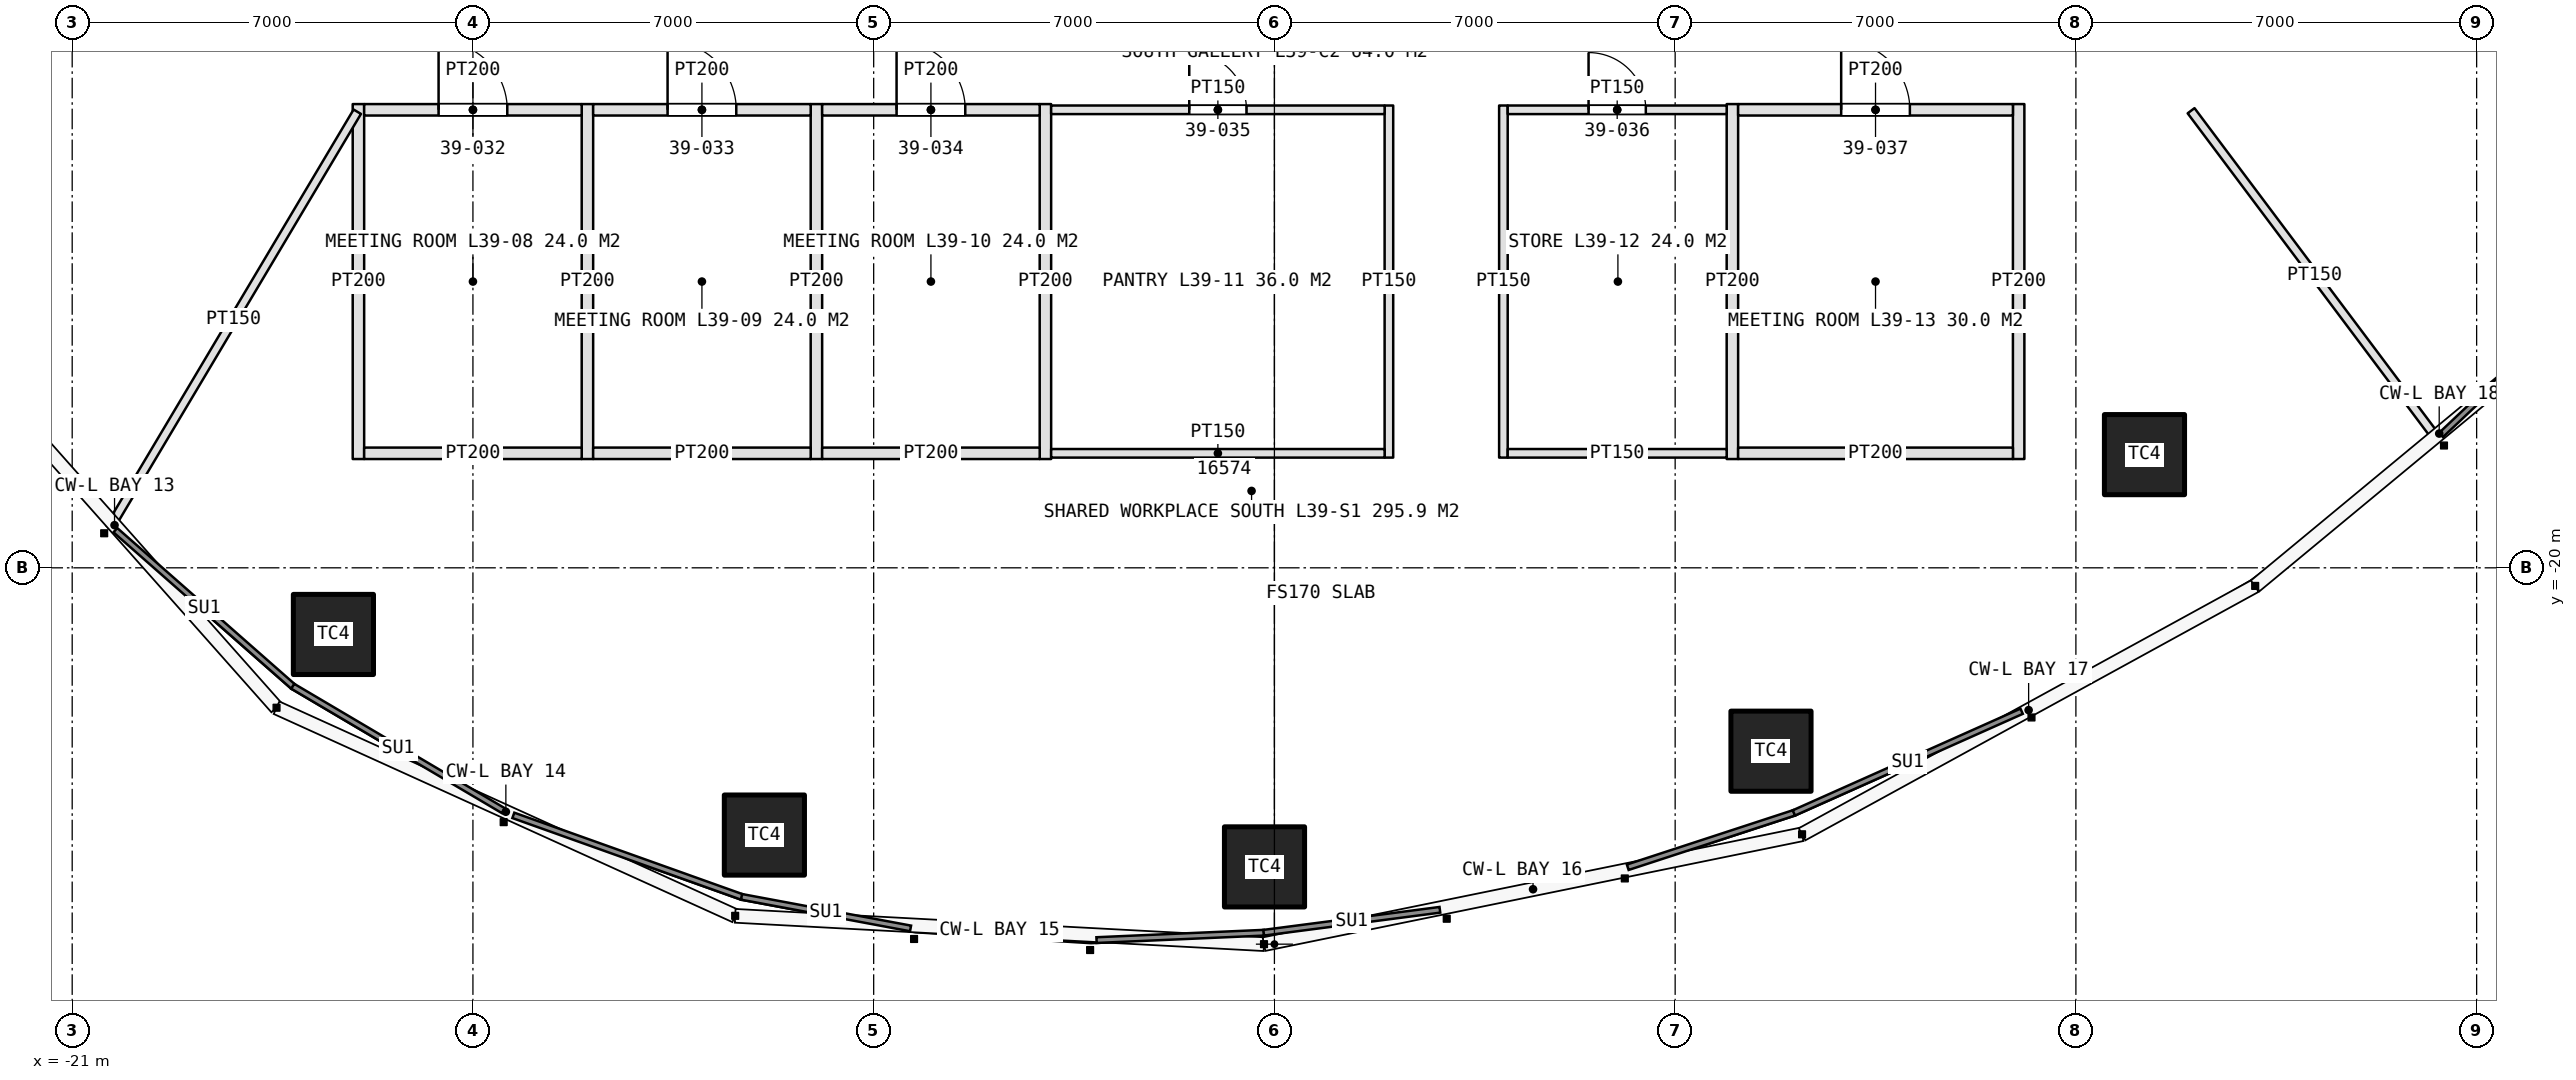
"""IFC4 building model, lengths in metres.
Left out: names, types, materials, properties, quantities, classifications, styles, units other than length and angle.
Written with IfcOpenShell. Run it as: python <this file> out.ifc"""

import sys

from ifc_helpers import new_model, si_unit, direction, frame, frame_2d, origin, origin_2d, place, context, subcontext, project, spatial, rectangle, extrude, element, fill, save


model = new_model("IFC4")
c1 = context("Model", 3, precision=1e-05, world=origin(), true_north=direction((0.0, 1.0)))
c2 = subcontext(c1, "Body", "Model", "MODEL_VIEW")
j1 = project(units=[si_unit("LENGTHUNIT", "METRE"), si_unit("PLANEANGLEUNIT", "RADIAN")], contexts=[c1])
p1 = place(None, origin())
s1 = spatial("IfcSite", under=j1, at=p1, CompositionType="ELEMENT")
p2 = place(p1, origin())
s2 = spatial("IfcBuilding", under=s1, at=p2, CompositionType="ELEMENT")
p3 = place(p2, frame((0.0, 0.0, 180.6)))
s3 = spatial("IfcBuildingStorey", under=s2, at=p3, CompositionType="ELEMENT", Elevation=180.6)
for number, where, z_axis, x_axis in (
    (1, (-16.437, -21.164, 0.0), (0.0, 0.0, 1.0), (1.0, 0.0, 0.0)),
    (2, (-8.909, -24.668, 0.0), (0.0, 0.0, 1.0), (1.0, 0.0, 0.0)),
    (3, (-0.173, -25.224, 0.0), (0.0, 0.0, 1.0), (1.0, 0.0, 0.0)),
    (4, (8.674, -23.203, 0.0), (0.0, 0.0, 1.0), (1.0, 0.0, 0.0)),
    (5, (15.198, -18.023, 0.0), (0.0, 0.0, 1.0), (1.0, 0.0, 0.0)),
):
    element("IfcColumn", number, at=place(p3, frame(where, z_axis=z_axis, x_axis=x_axis)), inside=s3, PredefinedType="COLUMN", context=c2, shape_type="SweptSolid", body=[
        extrude(rectangle(XDim=1.4, YDim=1.4, at=origin_2d()), origin(), (0.0, 0.0, 1.0), 4.2),
    ])
for number, where, z_axis, x_axis in (
    (6, (-16.0, -11.9, 0.0), (0.0, 0.0, 1.0), (0.0, -1.0, 0.0)),
    (7, (-12.0, -11.9, 0.0), (0.0, 0.0, 1.0), (0.0, -1.0, 0.0)),
    (8, (-8.0, -11.9, 0.0), (0.0, 0.0, 1.0), (0.0, -1.0, 0.0)),
    (9, (-4.0, -11.9, 0.0), (0.0, 0.0, 1.0), (0.0, -1.0, 0.0)),
):
    element("IfcWall", number, at=place(p3, frame(where, z_axis=z_axis, x_axis=x_axis)), inside=s3, PredefinedType="PARTITIONING", context=c2, shape_type="SweptSolid", body=[
        extrude(rectangle(XDim=6.2, YDim=0.2, at=frame_2d((3.1, 0.0))), origin(), (0.0, 0.0, 1.0), 3.0),
    ])
p4 = place(p3, frame((2.0, -11.925, 0.0), z_axis=(0.0, 0.0, 1.0), x_axis=(0.0, -1.0, 0.0)))
e10 = element("IfcWall", 10, at=p4, inside=s3, PredefinedType="PARTITIONING", context=c2, shape_type="SweptSolid", body=[
    extrude(rectangle(XDim=6.15, YDim=0.15, at=frame_2d((3.075, 0.0))), origin(), (0.0, 0.0, 1.0), 3.0),
])
p5 = place(p3, frame((-15.9, -12.0, 0.0), z_axis=(0.0, 0.0, 1.0), x_axis=(1.0, 0.0, 0.0)))
e11 = element("IfcWall", 11, at=p5, inside=s3, PredefinedType="PARTITIONING", context=c2, shape_type="SweptSolid", body=[
    extrude(rectangle(XDim=3.8, YDim=0.2, at=frame_2d((1.9, 0.0))), origin(), (0.0, 0.0, 1.0), 3.0),
])
p6 = place(p5, frame((1.3, 0.0, 0.0)))
e12 = element("IfcOpeningElement", 12, at=p6, cuts=e11, PredefinedType="OPENING", context=c2, shape_type="SweptSolid", body=[
    extrude(rectangle(XDim=1.2, YDim=2.4, at=frame_2d((0.6, 1.2))), frame((0.0, 0.11, 0.0), z_axis=(0.0, -1.0, 0.0), x_axis=(1.0, 0.0, 0.0)), (0.0, 0.0, 1.0), 0.22),
])
p7 = place(p3, frame((-15.9, -18.0, 0.0), z_axis=(0.0, 0.0, 1.0), x_axis=(1.0, 0.0, 0.0)))
e13 = element("IfcWall", 13, at=p7, inside=s3, PredefinedType="PARTITIONING", context=c2, shape_type="SweptSolid", body=[
    extrude(rectangle(XDim=3.8, YDim=0.2, at=frame_2d((1.9, 0.0))), origin(), (0.0, 0.0, 1.0), 3.0),
])
p8 = place(p3, frame((-11.9, -12.0, 0.0), z_axis=(0.0, 0.0, 1.0), x_axis=(1.0, 0.0, 0.0)))
e14 = element("IfcWall", 14, at=p8, inside=s3, PredefinedType="PARTITIONING", context=c2, shape_type="SweptSolid", body=[
    extrude(rectangle(XDim=3.8, YDim=0.2, at=frame_2d((1.9, 0.0))), origin(), (0.0, 0.0, 1.0), 3.0),
])
p9 = place(p8, frame((1.3, 0.0, 0.0)))
e15 = element("IfcOpeningElement", 15, at=p9, cuts=e14, PredefinedType="OPENING", context=c2, shape_type="SweptSolid", body=[
    extrude(rectangle(XDim=1.2, YDim=2.4, at=frame_2d((0.6, 1.2))), frame((0.0, 0.11, 0.0), z_axis=(0.0, -1.0, 0.0), x_axis=(1.0, 0.0, 0.0)), (0.0, 0.0, 1.0), 0.22),
])
p10 = place(p3, frame((-11.9, -18.0, 0.0), z_axis=(0.0, 0.0, 1.0), x_axis=(1.0, 0.0, 0.0)))
e16 = element("IfcWall", 16, at=p10, inside=s3, PredefinedType="PARTITIONING", context=c2, shape_type="SweptSolid", body=[
    extrude(rectangle(XDim=3.8, YDim=0.2, at=frame_2d((1.9, 0.0))), origin(), (0.0, 0.0, 1.0), 3.0),
])
p11 = place(p3, frame((-7.9, -12.0, 0.0), z_axis=(0.0, 0.0, 1.0), x_axis=(1.0, 0.0, 0.0)))
e17 = element("IfcWall", 17, at=p11, inside=s3, PredefinedType="PARTITIONING", context=c2, shape_type="SweptSolid", body=[
    extrude(rectangle(XDim=3.8, YDim=0.2, at=frame_2d((1.9, 0.0))), origin(), (0.0, 0.0, 1.0), 3.0),
])
p12 = place(p11, frame((1.3, 0.0, 0.0)))
e18 = element("IfcOpeningElement", 18, at=p12, cuts=e17, PredefinedType="OPENING", context=c2, shape_type="SweptSolid", body=[
    extrude(rectangle(XDim=1.2, YDim=2.4, at=frame_2d((0.6, 1.2))), frame((0.0, 0.11, 0.0), z_axis=(0.0, -1.0, 0.0), x_axis=(1.0, 0.0, 0.0)), (0.0, 0.0, 1.0), 0.22),
])
p13 = place(p3, frame((-7.9, -18.0, 0.0), z_axis=(0.0, 0.0, 1.0), x_axis=(1.0, 0.0, 0.0)))
e19 = element("IfcWall", 19, at=p13, inside=s3, PredefinedType="PARTITIONING", context=c2, shape_type="SweptSolid", body=[
    extrude(rectangle(XDim=3.8, YDim=0.2, at=frame_2d((1.9, 0.0))), origin(), (0.0, 0.0, 1.0), 3.0),
])
p14 = place(p3, frame((-3.9, -12.0, 0.0), z_axis=(0.0, 0.0, 1.0), x_axis=(1.0, 0.0, 0.0)))
e20 = element("IfcWall", 20, at=p14, inside=s3, PredefinedType="PARTITIONING", context=c2, shape_type="SweptSolid", body=[
    extrude(rectangle(XDim=5.825, YDim=0.15, at=frame_2d((2.913, 0.0))), origin(), (0.0, 0.0, 1.0), 3.0),
])
p15 = place(p14, frame((2.413, 0.0, 0.0)))
e21 = element("IfcOpeningElement", 21, at=p15, cuts=e20, PredefinedType="OPENING", context=c2, shape_type="SweptSolid", body=[
    extrude(rectangle(XDim=1.0, YDim=2.2, at=frame_2d((0.5, 1.1))), frame((0.0, 0.085, 0.0), z_axis=(0.0, -1.0, 0.0), x_axis=(1.0, 0.0, 0.0)), (0.0, 0.0, 1.0), 0.17),
])
p16 = place(p3, frame((-3.9, -18.0, 0.0), z_axis=(0.0, 0.0, 1.0), x_axis=(1.0, 0.0, 0.0)))
e22 = element("IfcWall", 22, at=p16, inside=s3, PredefinedType="PARTITIONING", context=c2, shape_type="SweptSolid", body=[
    extrude(rectangle(XDim=5.825, YDim=0.15, at=frame_2d((2.913, 0.0))), origin(), (0.0, 0.0, 1.0), 3.0),
])
p17 = place(p3, frame((4.0, -11.925, 0.0), z_axis=(0.0, 0.0, 1.0), x_axis=(0.0, -1.0, 0.0)))
e23 = element("IfcWall", 23, at=p17, inside=s3, PredefinedType="PARTITIONING", context=c2, shape_type="SweptSolid", body=[
    extrude(rectangle(XDim=6.15, YDim=0.15, at=frame_2d((3.075, 0.0))), origin(), (0.0, 0.0, 1.0), 3.0),
])
for number, where, z_axis, x_axis in (
    (24, (8.0, -11.9, 0.0), (0.0, 0.0, 1.0), (0.0, -1.0, 0.0)),
    (25, (13.0, -11.9, 0.0), (0.0, 0.0, 1.0), (0.0, -1.0, 0.0)),
):
    element("IfcWall", number, at=place(p3, frame(where, z_axis=z_axis, x_axis=x_axis)), inside=s3, PredefinedType="PARTITIONING", context=c2, shape_type="SweptSolid", body=[
        extrude(rectangle(XDim=6.2, YDim=0.2, at=frame_2d((3.1, 0.0))), origin(), (0.0, 0.0, 1.0), 3.0),
    ])
p18 = place(p3, frame((4.075, -12.0, 0.0), z_axis=(0.0, 0.0, 1.0), x_axis=(1.0, 0.0, 0.0)))
e26 = element("IfcWall", 26, at=p18, inside=s3, PredefinedType="PARTITIONING", context=c2, shape_type="SweptSolid", body=[
    extrude(rectangle(XDim=3.825, YDim=0.15, at=frame_2d((1.913, 0.0))), origin(), (0.0, 0.0, 1.0), 3.0),
])
p19 = place(p18, frame((1.413, 0.0, 0.0)))
e27 = element("IfcOpeningElement", 27, at=p19, cuts=e26, PredefinedType="OPENING", context=c2, shape_type="SweptSolid", body=[
    extrude(rectangle(XDim=1.0, YDim=2.2, at=frame_2d((0.5, 1.1))), frame((0.0, 0.085, 0.0), z_axis=(0.0, -1.0, 0.0), x_axis=(1.0, 0.0, 0.0)), (0.0, 0.0, 1.0), 0.17),
])
p20 = place(p3, frame((4.075, -18.0, 0.0), z_axis=(0.0, 0.0, 1.0), x_axis=(1.0, 0.0, 0.0)))
e28 = element("IfcWall", 28, at=p20, inside=s3, PredefinedType="PARTITIONING", context=c2, shape_type="SweptSolid", body=[
    extrude(rectangle(XDim=3.825, YDim=0.15, at=frame_2d((1.913, 0.0))), origin(), (0.0, 0.0, 1.0), 3.0),
])
p21 = place(p3, frame((8.1, -12.0, 0.0), z_axis=(0.0, 0.0, 1.0), x_axis=(1.0, 0.0, 0.0)))
e29 = element("IfcWall", 29, at=p21, inside=s3, PredefinedType="PARTITIONING", context=c2, shape_type="SweptSolid", body=[
    extrude(rectangle(XDim=4.8, YDim=0.2, at=frame_2d((2.4, 0.0))), origin(), (0.0, 0.0, 1.0), 3.0),
])
p22 = place(p21, frame((1.8, 0.0, 0.0)))
e30 = element("IfcOpeningElement", 30, at=p22, cuts=e29, PredefinedType="OPENING", context=c2, shape_type="SweptSolid", body=[
    extrude(rectangle(XDim=1.2, YDim=2.4, at=frame_2d((0.6, 1.2))), frame((0.0, 0.11, 0.0), z_axis=(0.0, -1.0, 0.0), x_axis=(1.0, 0.0, 0.0)), (0.0, 0.0, 1.0), 0.22),
])
p23 = place(p3, frame((8.1, -18.0, 0.0), z_axis=(0.0, 0.0, 1.0), x_axis=(1.0, 0.0, 0.0)))
e31 = element("IfcWall", 31, at=p23, inside=s3, PredefinedType="PARTITIONING", context=c2, shape_type="SweptSolid", body=[
    extrude(rectangle(XDim=4.8, YDim=0.2, at=frame_2d((2.4, 0.0))), origin(), (0.0, 0.0, 1.0), 3.0),
])
p24 = place(p3, frame((-16.02, -12.034, 0.0), z_axis=(0.0, 0.0, 1.0), x_axis=(-0.511518902153, -0.859272024879, 0.0)))
e32 = element("IfcWall", 32, at=p24, inside=s3, PredefinedType="PARTITIONING", context=c2, shape_type="SweptSolid", body=[
    extrude(rectangle(XDim=8.451, YDim=0.15, at=frame_2d((4.226, 0.0))), origin(), (0.0, 0.0, 1.0), 3.0),
])
p25 = place(p3, frame((16.012, -12.016, 0.0), z_axis=(0.0, 0.0, 1.0), x_axis=(0.600059749679, -0.799955184254, 0.0)))
e33 = element("IfcWall", 33, at=p25, inside=s3, PredefinedType="PARTITIONING", context=c2, shape_type="SweptSolid", body=[
    extrude(rectangle(XDim=7.191, YDim=0.15, at=frame_2d((3.596, 0.0))), origin(), (0.0, 0.0, 1.0), 3.0),
])
p26 = place(p6, origin())
e34 = element("IfcDoor", 34, at=p26, inside=s3, OperationType="SINGLE_SWING_LEFT", PredefinedType="DOOR", context=c2, shape_type="SweptSolid", body=[
    extrude(rectangle(XDim=1.2, YDim=2.4, at=frame_2d((0.6, 1.2))), frame((0.0, 0.025, 0.0), z_axis=(0.0, -1.0, 0.0), x_axis=(1.0, 0.0, 0.0)), (0.0, 0.0, 1.0), 0.05),
])
fill(e12, e34)
p27 = place(p9, origin())
e35 = element("IfcDoor", 35, at=p27, inside=s3, OperationType="SINGLE_SWING_LEFT", PredefinedType="DOOR", context=c2, shape_type="SweptSolid", body=[
    extrude(rectangle(XDim=1.2, YDim=2.4, at=frame_2d((0.6, 1.2))), frame((0.0, 0.025, 0.0), z_axis=(0.0, -1.0, 0.0), x_axis=(1.0, 0.0, 0.0)), (0.0, 0.0, 1.0), 0.05),
])
fill(e15, e35)
p28 = place(p12, origin())
e36 = element("IfcDoor", 36, at=p28, inside=s3, OperationType="SINGLE_SWING_LEFT", PredefinedType="DOOR", context=c2, shape_type="SweptSolid", body=[
    extrude(rectangle(XDim=1.2, YDim=2.4, at=frame_2d((0.6, 1.2))), frame((0.0, 0.025, 0.0), z_axis=(0.0, -1.0, 0.0), x_axis=(1.0, 0.0, 0.0)), (0.0, 0.0, 1.0), 0.05),
])
fill(e18, e36)
p29 = place(p15, origin())
e37 = element("IfcDoor", 37, at=p29, inside=s3, OperationType="SINGLE_SWING_LEFT", PredefinedType="DOOR", context=c2, shape_type="SweptSolid", body=[
    extrude(rectangle(XDim=1.0, YDim=2.2, at=frame_2d((0.5, 1.1))), frame((0.0, 0.025, 0.0), z_axis=(0.0, -1.0, 0.0), x_axis=(1.0, 0.0, 0.0)), (0.0, 0.0, 1.0), 0.05),
])
fill(e21, e37)
p30 = place(p19, origin())
e38 = element("IfcDoor", 38, at=p30, inside=s3, OperationType="SINGLE_SWING_LEFT", PredefinedType="DOOR", context=c2, shape_type="SweptSolid", body=[
    extrude(rectangle(XDim=1.0, YDim=2.2, at=frame_2d((0.5, 1.1))), frame((0.0, 0.025, 0.0), z_axis=(0.0, -1.0, 0.0), x_axis=(1.0, 0.0, 0.0)), (0.0, 0.0, 1.0), 0.05),
])
fill(e27, e38)
p31 = place(p22, origin())
e39 = element("IfcDoor", 39, at=p31, inside=s3, OperationType="SINGLE_SWING_LEFT", PredefinedType="DOOR", context=c2, shape_type="SweptSolid", body=[
    extrude(rectangle(XDim=1.2, YDim=2.4, at=frame_2d((0.6, 1.2))), frame((0.0, 0.025, 0.0), z_axis=(0.0, -1.0, 0.0), x_axis=(1.0, 0.0, 0.0)), (0.0, 0.0, 1.0), 0.05),
])
fill(e30, e39)
save(model, sys.argv[1])
